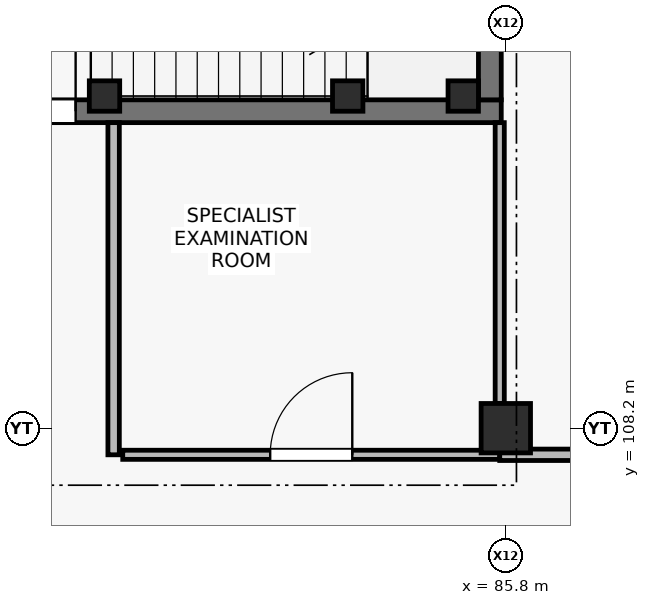
"""IFC4 building model, lengths in metres.
Left out: names, types, materials, properties, quantities, classifications, styles, units other than length and angle.
Written with IfcOpenShell. Run it as: python <this file> out.ifc"""

import sys

from ifc_helpers import new_model, si_unit, direction, frame, frame_2d, origin, origin_2d, place, context, subcontext, project, spatial, rectangle, extrude, element, fill, save


model = new_model("IFC4")
c1 = context("Model", 3, precision=1e-05, world=origin(), true_north=direction((0.0, 1.0)))
c2 = subcontext(c1, "Body", "Model", "MODEL_VIEW")
j1 = project(units=[si_unit("LENGTHUNIT", "METRE"), si_unit("PLANEANGLEUNIT", "RADIAN")], contexts=[c1])
p1 = place(None, origin())
s1 = spatial("IfcSite", under=j1, at=p1, CompositionType="ELEMENT")
p2 = place(p1, origin())
s2 = spatial("IfcBuilding", under=s1, at=p2, CompositionType="ELEMENT")
p3 = place(p2, origin())
s3 = spatial("IfcBuildingStorey", under=s2, at=p3, CompositionType="ELEMENT", Elevation=0.0)
p4 = place(p3, frame((85.8, 108.2, 0.0), z_axis=(0.0, 0.0, 1.0), x_axis=(1.0, 0.0, 0.0)))
e1 = element("IfcColumn", 1, at=p4, inside=s3, PredefinedType="COLUMN", context=c2, shape_type="SweptSolid", body=[
    extrude(rectangle(XDim=0.65, YDim=0.65, at=origin_2d()), origin(), (0.0, 0.0, 1.0), 4.8),
])
for number, where, z_axis, x_axis in (
    (2, (80.52, 112.57, 0.0), (0.0, 0.0, 1.0), (1.0, 0.0, 0.0)),
    (3, (83.72, 112.57, 0.0), (0.0, 0.0, 1.0), (1.0, 0.0, 0.0)),
    (4, (85.24, 112.57, 0.0), (0.0, 0.0, 1.0), (1.0, 0.0, 0.0)),
):
    element("IfcColumn", number, at=place(p3, frame(where, z_axis=z_axis, x_axis=x_axis)), inside=s3, PredefinedType="COLUMN", context=c2, shape_type="SweptSolid", body=[
        extrude(rectangle(XDim=0.4, YDim=0.4, at=origin_2d()), origin(), (0.0, 0.0, 1.0), 4.8),
    ])
p5 = place(p3, frame((78.24, 112.37, 0.0), z_axis=(0.0, 0.0, 1.0), x_axis=(1.0, 0.0, 0.0)))
e5 = element("IfcWall", 5, at=p5, inside=s3, PredefinedType="SHEAR", context=c2, shape_type="SweptSolid", body=[
    extrude(rectangle(XDim=7.5, YDim=0.3, at=frame_2d((3.75, 0.0))), origin(), (0.0, 0.0, 1.0), 4.54),
])
p6 = place(p5, frame((0.5, 0.0, 0.0)))
e6 = element("IfcOpeningElement", 6, at=p6, cuts=e5, PredefinedType="OPENING", context=c2, shape_type="SweptSolid", body=[
    extrude(rectangle(XDim=1.4, YDim=2.2, at=frame_2d((0.7, 1.1))), frame((0.0, 0.16, 0.0), z_axis=(0.0, -1.0, 0.0), x_axis=(1.0, 0.0, 0.0)), (0.0, 0.0, 1.0), 0.32),
])
p7 = place(p3, frame((85.59, 112.52, 0.0), z_axis=(0.0, 0.0, 1.0), x_axis=(0.0, 1.0, 0.0)))
e7 = element("IfcWall", 7, at=p7, inside=s3, PredefinedType="SHEAR", context=c2, shape_type="SweptSolid", body=[
    extrude(rectangle(XDim=3.33, YDim=0.3, at=frame_2d((1.665, 0.0))), origin(), (0.0, 0.0, 1.0), 4.54),
])
p8 = place(p3, frame((80.64, 107.85, 0.0), z_axis=(0.0, 0.0, 1.0), x_axis=(0.0, 1.0, 0.0)))
e8 = element("IfcWall", 8, at=p8, inside=s3, PredefinedType="PARTITIONING", context=c2, shape_type="SweptSolid", body=[
    extrude(rectangle(XDim=4.37, YDim=0.15, at=frame_2d((2.185, 0.0))), origin(), (0.0, 0.0, 1.0), 4.54),
])
p9 = place(p3, frame((80.76, 107.85, 0.0), z_axis=(0.0, 0.0, 1.0), x_axis=(1.0, 0.0, 0.0)))
e9 = element("IfcWall", 9, at=p9, inside=s3, PredefinedType="PARTITIONING", context=c2, shape_type="SweptSolid", body=[
    extrude(rectangle(XDim=4.96, YDim=0.12, at=frame_2d((2.48, 0.0))), origin(), (0.0, 0.0, 1.0), 4.04),
])
p10 = place(p9, frame((1.94, 0.0, 0.0)))
e10 = element("IfcOpeningElement", 10, at=p10, cuts=e9, PredefinedType="OPENING", context=c2, shape_type="SweptSolid", body=[
    extrude(rectangle(XDim=1.08, YDim=2.2, at=frame_2d((0.54, 1.1))), frame((0.0, 0.07, 0.0), z_axis=(0.0, -1.0, 0.0), x_axis=(1.0, 0.0, 0.0)), (0.0, 0.0, 1.0), 0.14),
])
p11 = place(p3, frame((85.72, 107.85, 0.0), z_axis=(0.0, 0.0, 1.0), x_axis=(1.0, 0.0, 0.0)))
e11 = element("IfcWall", 11, at=p11, inside=s3, PredefinedType="PARTITIONING", context=c2, shape_type="SweptSolid", body=[
    extrude(rectangle(XDim=5.85, YDim=0.15, at=frame_2d((2.925, 0.0))), origin(), (0.0, 0.0, 1.0), 4.04),
])
p12 = place(p11, frame((2.285, 0.0, 0.0)))
e12 = element("IfcOpeningElement", 12, at=p12, cuts=e11, PredefinedType="OPENING", context=c2, shape_type="SweptSolid", body=[
    extrude(rectangle(XDim=1.28, YDim=2.25, at=frame_2d((0.64, 1.125))), frame((0.0, 0.085, 0.0), z_axis=(0.0, -1.0, 0.0), x_axis=(1.0, 0.0, 0.0)), (0.0, 0.0, 1.0), 0.17),
])
p13 = place(p3, frame((85.72, 108.525, 0.0), z_axis=(0.0, 0.0, 1.0), x_axis=(0.0, 1.0, 0.0)))
e13 = element("IfcWall", 13, at=p13, inside=s3, PredefinedType="PARTITIONING", context=c2, shape_type="SweptSolid", body=[
    extrude(rectangle(XDim=3.695, YDim=0.12, at=frame_2d((1.848, 0.0))), origin(), (0.0, 0.0, 1.0), 4.09),
])
p14 = place(p6, origin())
e14 = element("IfcDoor", 14, at=p14, inside=s3, OperationType="SINGLE_SWING_RIGHT", PredefinedType="DOOR", context=c2, shape_type="SweptSolid", body=[
    extrude(rectangle(XDim=1.4, YDim=2.2, at=frame_2d((0.7, 1.1))), frame((0.0, 0.025, 0.0), z_axis=(0.0, -1.0, 0.0), x_axis=(1.0, 0.0, 0.0)), (0.0, 0.0, 1.0), 0.05),
])
fill(e6, e14)
p15 = place(p10, origin())
e15 = element("IfcDoor", 15, at=p15, inside=s3, OperationType="SINGLE_SWING_RIGHT", PredefinedType="DOOR", context=c2, shape_type="SweptSolid", body=[
    extrude(rectangle(XDim=1.08, YDim=2.2, at=frame_2d((0.54, 1.1))), frame((0.0, 0.025, 0.0), z_axis=(0.0, -1.0, 0.0), x_axis=(1.0, 0.0, 0.0)), (0.0, 0.0, 1.0), 0.05),
])
fill(e10, e15)
save(model, sys.argv[1])
